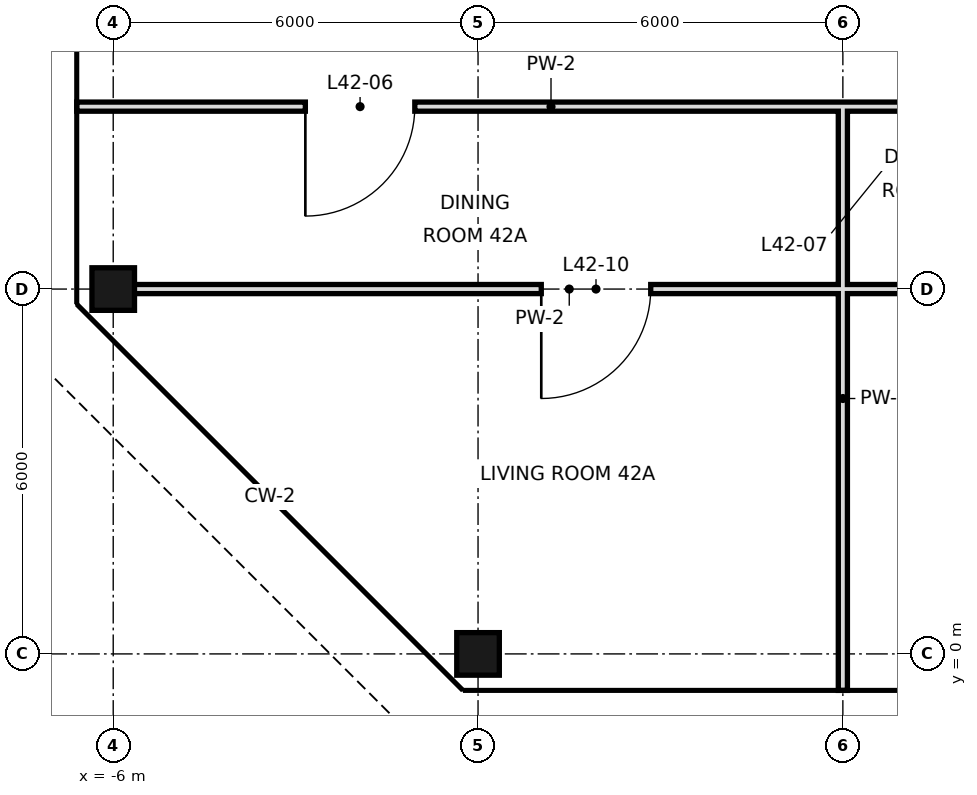
"""IFC4 building model, lengths in metres.
Left out: names, types, materials, properties, quantities, classifications, styles, units other than length and angle.
Written with IfcOpenShell. Run it as: python <this file> out.ifc"""

import sys

from ifc_helpers import new_model, si_unit, direction, frame, frame_2d, origin, origin_2d, place, context, subcontext, project, spatial, rectangle, hollow_rectangle, extrude, element, fill, save


model = new_model("IFC4")
c1 = context("Model", 3, precision=1e-05, world=origin(), true_north=direction((0.0, 1.0)))
c2 = subcontext(c1, "Body", "Model", "MODEL_VIEW")
j1 = project(units=[si_unit("LENGTHUNIT", "METRE"), si_unit("PLANEANGLEUNIT", "RADIAN")], contexts=[c1])
p1 = place(None, origin())
s1 = spatial("IfcSite", under=j1, at=p1, CompositionType="ELEMENT")
p2 = place(p1, origin())
s2 = spatial("IfcBuilding", under=s1, at=p2, CompositionType="ELEMENT")
p3 = place(p2, frame((0.0, 0.0, 181.6)))
s3 = spatial("IfcBuildingStorey", under=s2, at=p3, CompositionType="ELEMENT", Elevation=181.6)
for number, where, z_axis, x_axis in (
    (1, (-6.0, 6.0, 0.0), (0.0, 0.0, 1.0), (1.0, 0.0, 0.0)),
    (2, (0.0, 0.0, 0.0), (0.0, 0.0, 1.0), (1.0, 0.0, 0.0)),
):
    element("IfcColumn", number, at=place(p3, frame(where, z_axis=z_axis, x_axis=x_axis)), inside=s3, PredefinedType="COLUMN", context=c2, shape_type="SweptSolid", body=[
        extrude(hollow_rectangle(XDim=0.7, YDim=0.7, WallThickness=0.036, at=origin_2d()), origin(), (0.0, 0.0, 1.0), 4.4),
    ])
p4 = place(p3, frame((6.0, -0.6, 0.0), z_axis=(0.0, 0.0, 1.0), x_axis=(0.0, 1.0, 0.0)))
e3 = element("IfcWall", 3, at=p4, inside=s3, PredefinedType="PARTITIONING", context=c2, shape_type="SweptSolid", body=[
    extrude(rectangle(XDim=9.6, YDim=0.15, at=frame_2d((4.8, 0.0))), origin(), (0.0, 0.0, 1.0), 3.4),
])
p5 = place(p3, frame((-6.0, 6.0, 0.0), z_axis=(0.0, 0.0, 1.0), x_axis=(1.0, 0.0, 0.0)))
e4 = element("IfcWall", 4, at=p5, inside=s3, PredefinedType="PARTITIONING", context=c2, shape_type="SweptSolid", body=[
    extrude(rectangle(XDim=15.0, YDim=0.15, at=frame_2d((7.5, 0.0))), origin(), (0.0, 0.0, 1.0), 3.65),
])
p6 = place(p5, frame((7.04, 0.0, 0.0)))
e5 = element("IfcOpeningElement", 5, at=p6, cuts=e4, PredefinedType="OPENING", context=c2, shape_type="SweptSolid", body=[
    extrude(rectangle(XDim=1.8, YDim=2.4, at=frame_2d((0.9, 1.2))), frame((0.0, 0.085, 0.0), z_axis=(0.0, -1.0, 0.0), x_axis=(1.0, 0.0, 0.0)), (0.0, 0.0, 1.0), 0.17),
])
p7 = place(p5, frame((13.3, 0.0, 0.0)))
e6 = element("IfcOpeningElement", 6, at=p7, cuts=e4, PredefinedType="OPENING", context=c2, shape_type="SweptSolid", body=[
    extrude(rectangle(XDim=1.0, YDim=2.4, at=frame_2d((0.5, 1.2))), frame((0.0, 0.085, 0.0), z_axis=(0.0, -1.0, 0.0), x_axis=(1.0, 0.0, 0.0)), (0.0, 0.0, 1.0), 0.17),
])
p8 = place(p3, frame((-6.6, 9.0, 0.0), z_axis=(0.0, 0.0, 1.0), x_axis=(1.0, 0.0, 0.0)))
e7 = element("IfcWall", 7, at=p8, inside=s3, PredefinedType="PARTITIONING", context=c2, shape_type="SweptSolid", body=[
    extrude(rectangle(XDim=15.6, YDim=0.15, at=frame_2d((7.8, 0.0))), origin(), (0.0, 0.0, 1.0), 4.1),
])
p9 = place(p8, frame((3.76, 0.0, 0.0)))
e8 = element("IfcOpeningElement", 8, at=p9, cuts=e7, PredefinedType="OPENING", context=c2, shape_type="SweptSolid", body=[
    extrude(rectangle(XDim=1.8, YDim=2.4, at=frame_2d((0.9, 1.2))), frame((0.0, 0.085, 0.0), z_axis=(0.0, -1.0, 0.0), x_axis=(1.0, 0.0, 0.0)), (0.0, 0.0, 1.0), 0.17),
])
p10 = place(p8, frame((13.6, 0.0, 0.0)))
e9 = element("IfcOpeningElement", 9, at=p10, cuts=e7, PredefinedType="OPENING", context=c2, shape_type="SweptSolid", body=[
    extrude(rectangle(XDim=1.0, YDim=2.4, at=frame_2d((0.5, 1.2))), frame((0.0, 0.085, 0.0), z_axis=(0.0, -1.0, 0.0), x_axis=(1.0, 0.0, 0.0)), (0.0, 0.0, 1.0), 0.17),
])
p11 = place(p9, frame((1.8, 0.0, 0.0), z_axis=(0.0, 0.0, 1.0), x_axis=(-1.0, 0.0, 0.0)))
e10 = element("IfcDoor", 10, at=p11, inside=s3, OperationType="SINGLE_SWING_RIGHT", PredefinedType="DOOR", context=c2, shape_type="SweptSolid", body=[
    extrude(rectangle(XDim=1.8, YDim=2.4, at=frame_2d((0.9, 1.2))), frame((0.0, 0.025, 0.0), z_axis=(0.0, -1.0, 0.0), x_axis=(1.0, 0.0, 0.0)), (0.0, 0.0, 1.0), 0.05),
])
fill(e8, e10)
p12 = place(p6, frame((1.8, 0.0, 0.0), z_axis=(0.0, 0.0, 1.0), x_axis=(-1.0, 0.0, 0.0)))
e11 = element("IfcDoor", 11, at=p12, inside=s3, OperationType="SINGLE_SWING_RIGHT", PredefinedType="DOOR", context=c2, shape_type="SweptSolid", body=[
    extrude(rectangle(XDim=1.8, YDim=2.4, at=frame_2d((0.9, 1.2))), frame((0.0, 0.025, 0.0), z_axis=(0.0, -1.0, 0.0), x_axis=(1.0, 0.0, 0.0)), (0.0, 0.0, 1.0), 0.05),
])
fill(e5, e11)
save(model, sys.argv[1])
